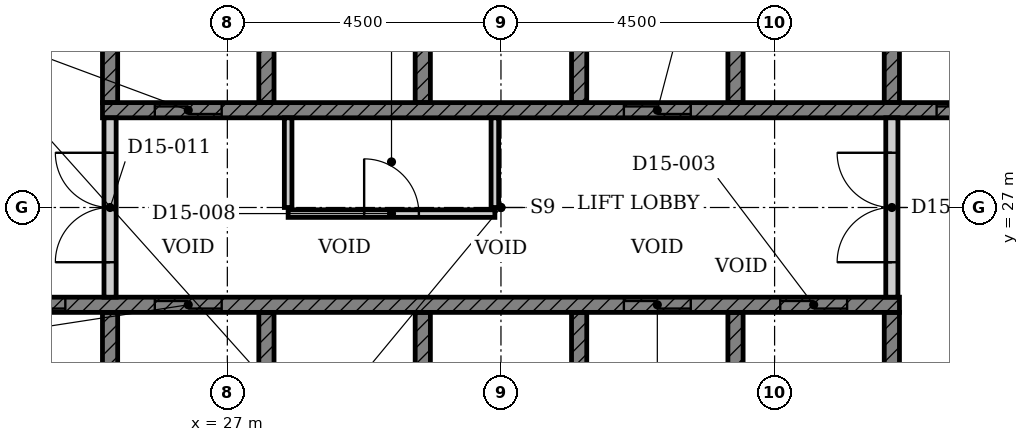
"""IFC4 building model, lengths in metres.
Left out: names, types, materials, properties, quantities, classifications, styles, units other than length and angle.
Written with IfcOpenShell. Run it as: python <this file> out.ifc"""

import sys

from ifc_helpers import new_model, si_unit, direction, frame, frame_2d, origin, place, context, subcontext, project, spatial, polyline, rectangle, outline, extrude, element, fill, save


model = new_model("IFC4")
c1 = context("Model", 3, precision=1e-05, world=origin(), true_north=direction((0.0, 1.0)))
c2 = subcontext(c1, "Body", "Model", "MODEL_VIEW")
j1 = project(units=[si_unit("LENGTHUNIT", "METRE"), si_unit("PLANEANGLEUNIT", "RADIAN")], contexts=[c1])
p1 = place(None, origin())
s1 = spatial("IfcSite", under=j1, at=p1, CompositionType="ELEMENT")
p2 = place(p1, origin())
s2 = spatial("IfcBuilding", under=s1, at=p2, CompositionType="ELEMENT")
p3 = place(p2, frame((0.0, 0.0, 67.2)))
s3 = spatial("IfcBuildingStorey", under=s2, at=p3, CompositionType="ELEMENT", Elevation=67.2)
p4 = place(p3, origin())
e1 = element("IfcWall", 1, at=p4, inside=s3, PredefinedType="SHEAR", context=c2, shape_type="SweptSolid", body=[
    extrude(outline(polyline([(22.375, 22.35), (38.053, 22.35), (38.053, 25.275), (37.803, 25.275), (37.803, 22.65), (35.482, 22.65), (35.482, 25.275), (35.232, 25.275), (35.232, 22.65), (32.911, 22.65), (32.911, 25.275), (32.661, 25.275), (32.661, 22.65), (30.339, 22.65), (30.339, 25.275), (30.089, 25.275), (30.089, 22.65), (27.768, 22.65), (27.768, 25.275), (27.518, 25.275), (27.518, 22.65), (25.197, 22.65), (25.197, 25.275), (24.947, 25.275), (24.947, 22.65), (22.625, 22.65), (22.625, 25.275), (22.375, 25.275), (22.375, 22.35)])), origin(), (0.0, 0.0, 1.0), 3.3),
])
p5 = place(p3, origin())
e2 = element("IfcWall", 2, at=p5, inside=s3, PredefinedType="SHEAR", context=c2, shape_type="SweptSolid", body=[
    extrude(outline(polyline([(24.947, 28.725), (25.197, 28.725), (25.197, 31.35), (27.518, 31.35), (27.518, 28.725), (27.768, 28.725), (27.768, 31.35), (30.089, 31.35), (30.089, 28.725), (30.339, 28.725), (30.339, 31.35), (32.661, 31.35), (32.661, 28.725), (32.911, 28.725), (32.911, 31.35), (35.232, 31.35), (35.232, 28.725), (35.482, 28.725), (35.482, 31.35), (37.803, 31.35), (37.803, 28.725), (38.053, 28.725), (38.053, 31.35), (40.375, 31.35), (40.375, 28.725), (40.625, 28.725), (40.625, 31.65), (24.947, 31.65), (24.947, 28.725)])), origin(), (0.0, 0.0, 1.0), 3.3),
])
p6 = place(p3, frame((22.375, 25.4, 0.0), z_axis=(0.0, 0.0, 1.0), x_axis=(1.0, 0.0, 0.0)))
e3 = element("IfcWall", 3, at=p6, inside=s3, PredefinedType="SHEAR", context=c2, shape_type="SweptSolid", body=[
    extrude(rectangle(XDim=15.678, YDim=0.25, at=frame_2d((7.839, 0.0))), origin(), (0.0, 0.0, 1.0), 3.3),
])
p7 = place(p6, frame((3.432, 0.0, 0.0)))
e4 = element("IfcOpeningElement", 4, at=p7, cuts=e3, PredefinedType="OPENING", context=c2, shape_type="SweptSolid", body=[
    extrude(rectangle(XDim=1.1, YDim=2.1, at=frame_2d((0.55, 1.05))), frame((0.0, 0.135, 0.0), z_axis=(0.0, -1.0, 0.0), x_axis=(1.0, 0.0, 0.0)), (0.0, 0.0, 1.0), 0.27),
])
p8 = place(p6, frame((11.146, 0.0, 0.0)))
e5 = element("IfcOpeningElement", 5, at=p8, cuts=e3, PredefinedType="OPENING", context=c2, shape_type="SweptSolid", body=[
    extrude(rectangle(XDim=1.1, YDim=2.1, at=frame_2d((0.55, 1.05))), frame((0.0, 0.135, 0.0), z_axis=(0.0, -1.0, 0.0), x_axis=(1.0, 0.0, 0.0)), (0.0, 0.0, 1.0), 0.27),
])
p9 = place(p6, frame((13.718, 0.0, 0.0)))
e6 = element("IfcOpeningElement", 6, at=p9, cuts=e3, PredefinedType="OPENING", context=c2, shape_type="SweptSolid", body=[
    extrude(rectangle(XDim=1.1, YDim=2.1, at=frame_2d((0.55, 1.05))), frame((0.0, 0.135, 0.0), z_axis=(0.0, -1.0, 0.0), x_axis=(1.0, 0.0, 0.0)), (0.0, 0.0, 1.0), 0.27),
])
p10 = place(p6, frame((0.861, 0.0, 0.0)))
e7 = element("IfcOpeningElement", 7, at=p10, cuts=e3, PredefinedType="OPENING", context=c2, shape_type="SweptSolid", body=[
    extrude(rectangle(XDim=1.1, YDim=2.1, at=frame_2d((0.55, 1.05))), frame((0.0, 0.135, 0.0), z_axis=(0.0, -1.0, 0.0), x_axis=(1.0, 0.0, 0.0)), (0.0, 0.0, 1.0), 0.27),
])
p11 = place(p3, frame((24.947, 28.6, 0.0), z_axis=(0.0, 0.0, 1.0), x_axis=(1.0, 0.0, 0.0)))
e8 = element("IfcWall", 8, at=p11, inside=s3, PredefinedType="SHEAR", context=c2, shape_type="SweptSolid", body=[
    extrude(rectangle(XDim=15.678, YDim=0.25, at=frame_2d((7.839, 0.0))), origin(), (0.0, 0.0, 1.0), 3.3),
])
p12 = place(p11, frame((0.861, 0.0, 0.0)))
e9 = element("IfcOpeningElement", 9, at=p12, cuts=e8, PredefinedType="OPENING", context=c2, shape_type="SweptSolid", body=[
    extrude(rectangle(XDim=1.1, YDim=2.1, at=frame_2d((0.55, 1.05))), frame((0.0, 0.135, 0.0), z_axis=(0.0, -1.0, 0.0), x_axis=(1.0, 0.0, 0.0)), (0.0, 0.0, 1.0), 0.27),
])
p13 = place(p11, frame((8.575, 0.0, 0.0)))
e10 = element("IfcOpeningElement", 10, at=p13, cuts=e8, PredefinedType="OPENING", context=c2, shape_type="SweptSolid", body=[
    extrude(rectangle(XDim=1.1, YDim=2.1, at=frame_2d((0.55, 1.05))), frame((0.0, 0.135, 0.0), z_axis=(0.0, -1.0, 0.0), x_axis=(1.0, 0.0, 0.0)), (0.0, 0.0, 1.0), 0.27),
])
p14 = place(p11, frame((13.718, 0.0, 0.0)))
e11 = element("IfcOpeningElement", 11, at=p14, cuts=e8, PredefinedType="OPENING", context=c2, shape_type="SweptSolid", body=[
    extrude(rectangle(XDim=1.1, YDim=2.1, at=frame_2d((0.55, 1.05))), frame((0.0, 0.135, 0.0), z_axis=(0.0, -1.0, 0.0), x_axis=(1.0, 0.0, 0.0)), (0.0, 0.0, 1.0), 0.27),
])
p15 = place(p3, frame((28.0, 26.9, 0.0), z_axis=(0.0, 0.0, 1.0), x_axis=(1.0, 0.0, 0.0)))
e12 = element("IfcWall", 12, at=p15, inside=s3, PredefinedType="PARTITIONING", context=c2, shape_type="SweptSolid", body=[
    extrude(rectangle(XDim=3.4, YDim=0.125, at=frame_2d((1.7, 0.0))), origin(), (0.0, 0.0, 1.0), 3.3),
])
p16 = place(p15, frame((1.25, 0.0, 0.0)))
e13 = element("IfcOpeningElement", 13, at=p16, cuts=e12, PredefinedType="OPENING", context=c2, shape_type="SweptSolid", body=[
    extrude(rectangle(XDim=0.9, YDim=2.1, at=frame_2d((0.45, 1.05))), frame((0.0, 0.073, 0.0), z_axis=(0.0, -1.0, 0.0), x_axis=(1.0, 0.0, 0.0)), (0.0, 0.0, 1.0), 0.145),
])
for number, where, z_axis, x_axis in (
    (14, (28.0, 28.475, 0.0), (0.0, 0.0, 1.0), (0.0, -1.0, 0.0)),
    (15, (31.4, 28.475, 0.0), (0.0, 0.0, 1.0), (0.0, -1.0, 0.0)),
):
    element("IfcWall", number, at=place(p3, frame(where, z_axis=z_axis, x_axis=x_axis)), inside=s3, PredefinedType="PARTITIONING", context=c2, shape_type="SweptSolid", body=[
        extrude(rectangle(XDim=1.475, YDim=0.125, at=frame_2d((0.738, 0.0))), origin(), (0.0, 0.0, 1.0), 3.3),
    ])
p17 = place(p3, frame((25.072, 25.525, 0.0), z_axis=(0.0, 0.0, 1.0), x_axis=(0.0, 1.0, 0.0)))
e16 = element("IfcWall", 16, at=p17, inside=s3, PredefinedType="PARTITIONING", context=c2, shape_type="SweptSolid", body=[
    extrude(rectangle(XDim=2.95, YDim=0.2, at=frame_2d((1.475, 0.0))), origin(), (0.0, 0.0, 1.0), 3.3),
])
p18 = place(p17, frame((0.575, 0.0, 0.0)))
e17 = element("IfcOpeningElement", 17, at=p18, cuts=e16, PredefinedType="OPENING", context=c2, shape_type="SweptSolid", body=[
    extrude(rectangle(XDim=1.8, YDim=2.1, at=frame_2d((0.9, 1.05))), frame((0.0, 0.11, 0.0), z_axis=(0.0, -1.0, 0.0), x_axis=(1.0, 0.0, 0.0)), (0.0, 0.0, 1.0), 0.22),
])
p19 = place(p3, frame((37.928, 25.525, 0.0), z_axis=(0.0, 0.0, 1.0), x_axis=(0.0, 1.0, 0.0)))
e18 = element("IfcWall", 18, at=p19, inside=s3, PredefinedType="PARTITIONING", context=c2, shape_type="SweptSolid", body=[
    extrude(rectangle(XDim=2.95, YDim=0.2, at=frame_2d((1.475, 0.0))), origin(), (0.0, 0.0, 1.0), 3.3),
])
p20 = place(p19, frame((0.575, 0.0, 0.0)))
e19 = element("IfcOpeningElement", 19, at=p20, cuts=e18, PredefinedType="OPENING", context=c2, shape_type="SweptSolid", body=[
    extrude(rectangle(XDim=1.8, YDim=2.1, at=frame_2d((0.9, 1.05))), frame((0.0, 0.11, 0.0), z_axis=(0.0, -1.0, 0.0), x_axis=(1.0, 0.0, 0.0)), (0.0, 0.0, 1.0), 0.22),
])
p21 = place(p7, origin())
e20 = element("IfcDoor", 20, at=p21, inside=s3, OperationType="DOUBLE_DOOR_SLIDING", PredefinedType="DOOR", context=c2, shape_type="SweptSolid", body=[
    extrude(rectangle(XDim=1.1, YDim=2.1, at=frame_2d((0.55, 1.05))), frame((0.0, 0.025, 0.0), z_axis=(0.0, -1.0, 0.0), x_axis=(1.0, 0.0, 0.0)), (0.0, 0.0, 1.0), 0.05),
])
fill(e4, e20)
p22 = place(p8, origin())
e21 = element("IfcDoor", 21, at=p22, inside=s3, OperationType="DOUBLE_DOOR_SLIDING", PredefinedType="DOOR", context=c2, shape_type="SweptSolid", body=[
    extrude(rectangle(XDim=1.1, YDim=2.1, at=frame_2d((0.55, 1.05))), frame((0.0, 0.025, 0.0), z_axis=(0.0, -1.0, 0.0), x_axis=(1.0, 0.0, 0.0)), (0.0, 0.0, 1.0), 0.05),
])
fill(e5, e21)
p23 = place(p9, origin())
e22 = element("IfcDoor", 22, at=p23, inside=s3, OperationType="DOUBLE_DOOR_SLIDING", PredefinedType="DOOR", context=c2, shape_type="SweptSolid", body=[
    extrude(rectangle(XDim=1.1, YDim=2.1, at=frame_2d((0.55, 1.05))), frame((0.0, 0.025, 0.0), z_axis=(0.0, -1.0, 0.0), x_axis=(1.0, 0.0, 0.0)), (0.0, 0.0, 1.0), 0.05),
])
fill(e6, e22)
p24 = place(p12, origin())
e23 = element("IfcDoor", 23, at=p24, inside=s3, OperationType="DOUBLE_DOOR_SLIDING", PredefinedType="DOOR", context=c2, shape_type="SweptSolid", body=[
    extrude(rectangle(XDim=1.1, YDim=2.1, at=frame_2d((0.55, 1.05))), frame((0.0, 0.025, 0.0), z_axis=(0.0, -1.0, 0.0), x_axis=(1.0, 0.0, 0.0)), (0.0, 0.0, 1.0), 0.05),
])
fill(e9, e23)
p25 = place(p13, origin())
e24 = element("IfcDoor", 24, at=p25, inside=s3, OperationType="DOUBLE_DOOR_SLIDING", PredefinedType="DOOR", context=c2, shape_type="SweptSolid", body=[
    extrude(rectangle(XDim=1.1, YDim=2.1, at=frame_2d((0.55, 1.05))), frame((0.0, 0.025, 0.0), z_axis=(0.0, -1.0, 0.0), x_axis=(1.0, 0.0, 0.0)), (0.0, 0.0, 1.0), 0.05),
])
fill(e10, e24)
p26 = place(p10, origin())
e25 = element("IfcDoor", 25, at=p26, inside=s3, OperationType="DOUBLE_DOOR_SLIDING", PredefinedType="DOOR", context=c2, shape_type="SweptSolid", body=[
    extrude(rectangle(XDim=1.1, YDim=2.1, at=frame_2d((0.55, 1.05))), frame((0.0, 0.025, 0.0), z_axis=(0.0, -1.0, 0.0), x_axis=(1.0, 0.0, 0.0)), (0.0, 0.0, 1.0), 0.05),
])
fill(e7, e25)
p27 = place(p14, origin())
e26 = element("IfcDoor", 26, at=p27, inside=s3, OperationType="DOUBLE_DOOR_SLIDING", PredefinedType="DOOR", context=c2, shape_type="SweptSolid", body=[
    extrude(rectangle(XDim=1.1, YDim=2.1, at=frame_2d((0.55, 1.05))), frame((0.0, 0.025, 0.0), z_axis=(0.0, -1.0, 0.0), x_axis=(1.0, 0.0, 0.0)), (0.0, 0.0, 1.0), 0.05),
])
fill(e11, e26)
p28 = place(p16, origin())
e27 = element("IfcDoor", 27, at=p28, inside=s3, OperationType="SINGLE_SWING_LEFT", PredefinedType="DOOR", context=c2, shape_type="SweptSolid", body=[
    extrude(rectangle(XDim=0.9, YDim=2.1, at=frame_2d((0.45, 1.05))), frame((0.0, 0.025, 0.0), z_axis=(0.0, -1.0, 0.0), x_axis=(1.0, 0.0, 0.0)), (0.0, 0.0, 1.0), 0.05),
])
fill(e13, e27)
p29 = place(p18, origin())
e28 = element("IfcDoor", 28, at=p29, inside=s3, OperationType="DOUBLE_DOOR_SINGLE_SWING", PredefinedType="DOOR", context=c2, shape_type="SweptSolid", body=[
    extrude(rectangle(XDim=1.8, YDim=2.1, at=frame_2d((0.9, 1.05))), frame((0.0, 0.025, 0.0), z_axis=(0.0, -1.0, 0.0), x_axis=(1.0, 0.0, 0.0)), (0.0, 0.0, 1.0), 0.05),
])
fill(e17, e28)
p30 = place(p20, origin())
e29 = element("IfcDoor", 29, at=p30, inside=s3, OperationType="DOUBLE_DOOR_SINGLE_SWING", PredefinedType="DOOR", context=c2, shape_type="SweptSolid", body=[
    extrude(rectangle(XDim=1.8, YDim=2.1, at=frame_2d((0.9, 1.05))), frame((0.0, 0.025, 0.0), z_axis=(0.0, -1.0, 0.0), x_axis=(1.0, 0.0, 0.0)), (0.0, 0.0, 1.0), 0.05),
])
fill(e19, e29)
save(model, sys.argv[1])
